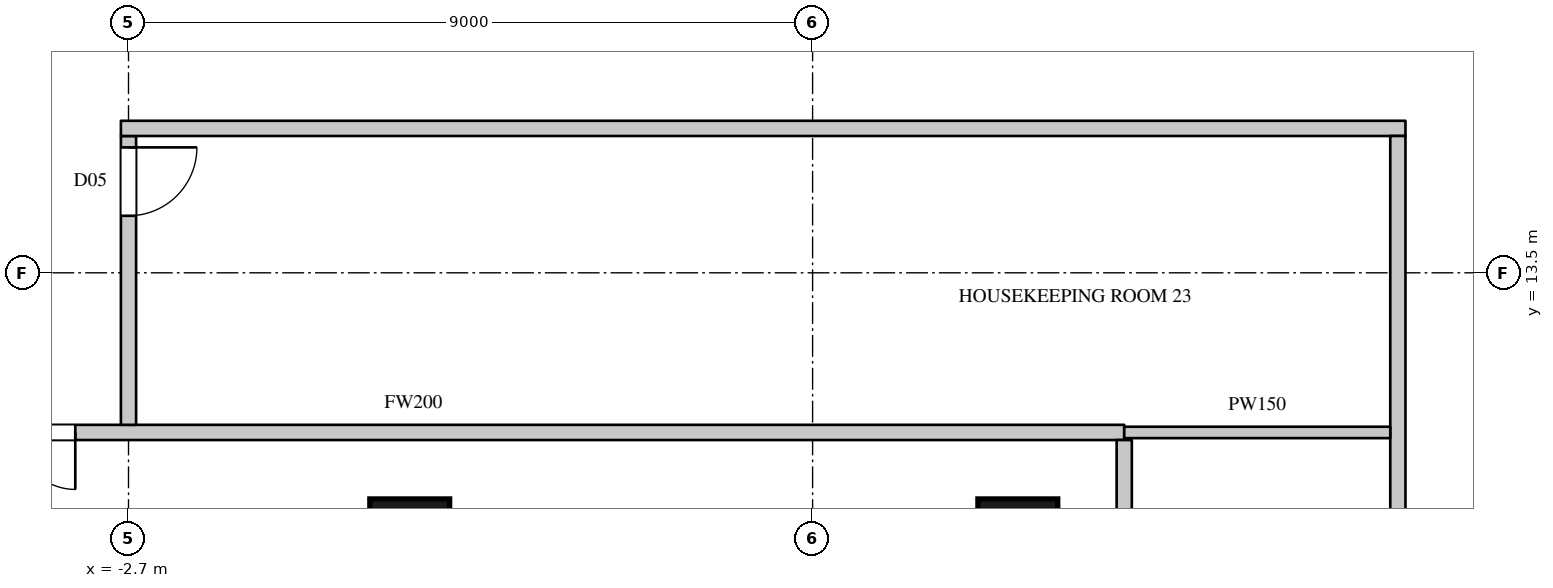
"""IFC4 building model, lengths in metres.
Left out: names, types, materials, properties, quantities, classifications, styles, units other than length and angle.
Written with IfcOpenShell. Run it as: python <this file> out.ifc"""

import sys

from ifc_helpers import new_model, si_unit, direction, frame, frame_2d, origin, origin_2d, place, context, subcontext, project, spatial, rectangle, circle, extrude, element, fill, save


model = new_model("IFC4")
c1 = context("Model", 3, precision=1e-05, world=origin(), true_north=direction((0.0, 1.0)))
c2 = subcontext(c1, "Body", "Model", "MODEL_VIEW")
j1 = project(units=[si_unit("LENGTHUNIT", "METRE"), si_unit("PLANEANGLEUNIT", "RADIAN")], contexts=[c1])
p1 = place(None, origin())
s1 = spatial("IfcSite", under=j1, at=p1, CompositionType="ELEMENT")
p2 = place(p1, origin())
s2 = spatial("IfcBuilding", under=s1, at=p2, CompositionType="ELEMENT")
p3 = place(p2, frame((0.0, 0.0, 113.1)))
s3 = spatial("IfcBuildingStorey", under=s2, at=p3, CompositionType="ELEMENT", Elevation=113.1)
for number, where, z_axis, x_axis in (
    (1, (1.0, 10.0, 0.0), (0.0, 0.0, 1.0), (1.0, 0.0, 0.0)),
    (2, (9.0, 10.0, 0.0), (0.0, 0.0, 1.0), (1.0, 0.0, 0.0)),
):
    element("IfcColumn", number, at=place(p3, frame(where, z_axis=z_axis, x_axis=x_axis)), inside=s3, PredefinedType="COLUMN", context=c2, shape_type="SweptSolid", body=[
        extrude(circle(Radius=0.525, at=origin_2d()), origin(), (0.0, 0.0, 1.0), 3.6),
    ])
p4 = place(p3, frame((-8.3, 11.4, 0.0), z_axis=(0.0, 0.0, 1.0), x_axis=(1.0, 0.0, 0.0)))
e3 = element("IfcWall", 3, at=p4, inside=s3, PredefinedType="PARTITIONING", context=c2, shape_type="SweptSolid", body=[
    extrude(rectangle(XDim=18.7, YDim=0.2, at=frame_2d((9.35, 0.0))), origin(), (0.0, 0.0, 1.0), 3.3),
])
p5 = place(p4, frame((3.4, 0.0, 0.0)))
e4 = element("IfcOpeningElement", 4, at=p5, cuts=e3, PredefinedType="OPENING", context=c2, shape_type="SweptSolid", body=[
    extrude(rectangle(XDim=1.5, YDim=2.2, at=frame_2d((0.75, 1.1))), frame((0.0, 0.11, 0.0), z_axis=(0.0, -1.0, 0.0), x_axis=(1.0, 0.0, 0.0)), (0.0, 0.0, 1.0), 0.22),
])
p6 = place(p3, frame((-2.7, 11.5, 0.0), z_axis=(0.0, 0.0, 1.0), x_axis=(0.0, 1.0, 0.0)))
e5 = element("IfcWall", 5, at=p6, inside=s3, PredefinedType="PARTITIONING", context=c2, shape_type="SweptSolid", body=[
    extrude(rectangle(XDim=3.8, YDim=0.2, at=frame_2d((1.9, 0.0))), origin(), (0.0, 0.0, 1.0), 2.75),
])
p7 = place(p6, frame((2.75, 0.0, 0.0)))
e6 = element("IfcOpeningElement", 6, at=p7, cuts=e5, PredefinedType="OPENING", context=c2, shape_type="SweptSolid", body=[
    extrude(rectangle(XDim=0.9, YDim=2.2, at=frame_2d((0.45, 1.1))), frame((0.0, 0.11, 0.0), z_axis=(0.0, -1.0, 0.0), x_axis=(1.0, 0.0, 0.0)), (0.0, 0.0, 1.0), 0.22),
])
p8 = place(p3, frame((-2.8, 15.4, 0.0), z_axis=(0.0, 0.0, 1.0), x_axis=(1.0, 0.0, 0.0)))
e7 = element("IfcWall", 7, at=p8, inside=s3, PredefinedType="PARTITIONING", context=c2, shape_type="SweptSolid", body=[
    extrude(rectangle(XDim=16.9, YDim=0.2, at=frame_2d((8.45, 0.0))), origin(), (0.0, 0.0, 1.0), 3.3),
])
p9 = place(p3, frame((10.4, -11.3, 0.0), z_axis=(0.0, 0.0, 1.0), x_axis=(0.0, 1.0, 0.0)))
e8 = element("IfcWall", 8, at=p9, inside=s3, PredefinedType="PARTITIONING", context=c2, shape_type="SweptSolid", body=[
    extrude(rectangle(XDim=22.6, YDim=0.2, at=frame_2d((11.3, 0.0))), origin(), (0.0, 0.0, 1.0), 3.3),
])
p10 = place(p9, frame((16.3, 0.0, 0.0)))
e9 = element("IfcOpeningElement", 9, at=p10, cuts=e8, PredefinedType="OPENING", context=c2, shape_type="SweptSolid", body=[
    extrude(rectangle(XDim=1.5, YDim=2.2, at=frame_2d((0.75, 1.1))), frame((0.0, 0.11, 0.0), z_axis=(0.0, -1.0, 0.0), x_axis=(1.0, 0.0, 0.0)), (0.0, 0.0, 1.0), 0.22),
])
p11 = place(p9, frame((14.65, 0.0, 0.0)))
e10 = element("IfcOpeningElement", 10, at=p11, cuts=e8, PredefinedType="OPENING", context=c2, shape_type="SweptSolid", body=[
    extrude(rectangle(XDim=1.5, YDim=2.2, at=frame_2d((0.75, 1.1))), frame((0.0, 0.11, 0.0), z_axis=(0.0, -1.0, 0.0), x_axis=(1.0, 0.0, 0.0)), (0.0, 0.0, 1.0), 0.22),
])
p12 = place(p9, frame((11.95, 0.0, 0.0)))
e11 = element("IfcOpeningElement", 11, at=p12, cuts=e8, PredefinedType="OPENING", context=c2, shape_type="SweptSolid", body=[
    extrude(rectangle(XDim=1.5, YDim=2.2, at=frame_2d((0.75, 1.1))), frame((0.0, 0.11, 0.0), z_axis=(0.0, -1.0, 0.0), x_axis=(1.0, 0.0, 0.0)), (0.0, 0.0, 1.0), 0.22),
])
p13 = place(p3, frame((14.0, 6.825, 0.0), z_axis=(0.0, 0.0, 1.0), x_axis=(0.0, 1.0, 0.0)))
e12 = element("IfcWall", 12, at=p13, inside=s3, PredefinedType="PARTITIONING", context=c2, shape_type="SweptSolid", body=[
    extrude(rectangle(XDim=8.475, YDim=0.2, at=frame_2d((4.238, 0.0))), origin(), (0.0, 0.0, 1.0), 3.3),
])
p14 = place(p3, frame((10.4, 11.4, 0.0), z_axis=(0.0, 0.0, 1.0), x_axis=(1.0, 0.0, 0.0)))
e13 = element("IfcWall", 13, at=p14, inside=s3, PredefinedType="PARTITIONING", context=c2, shape_type="SweptSolid", body=[
    extrude(rectangle(XDim=3.5, YDim=0.15, at=frame_2d((1.75, 0.0))), origin(), (0.0, 0.0, 1.0), 3.3),
])
p15 = place(p5, origin())
e14 = element("IfcDoor", 14, at=p15, inside=s3, OperationType="DOUBLE_DOOR_SINGLE_SWING", PredefinedType="DOOR", context=c2, shape_type="SweptSolid", body=[
    extrude(rectangle(XDim=1.5, YDim=2.2, at=frame_2d((0.75, 1.1))), frame((0.0, 0.025, 0.0), z_axis=(0.0, -1.0, 0.0), x_axis=(1.0, 0.0, 0.0)), (0.0, 0.0, 1.0), 0.05),
])
fill(e4, e14)
p16 = place(p7, origin())
e15 = element("IfcDoor", 15, at=p16, inside=s3, OperationType="SINGLE_SWING_LEFT", PredefinedType="DOOR", context=c2, shape_type="SweptSolid", body=[
    extrude(rectangle(XDim=0.9, YDim=2.2, at=frame_2d((0.45, 1.1))), frame((0.0, 0.025, 0.0), z_axis=(0.0, -1.0, 0.0), x_axis=(1.0, 0.0, 0.0)), (0.0, 0.0, 1.0), 0.05),
])
fill(e6, e15)
save(model, sys.argv[1])
